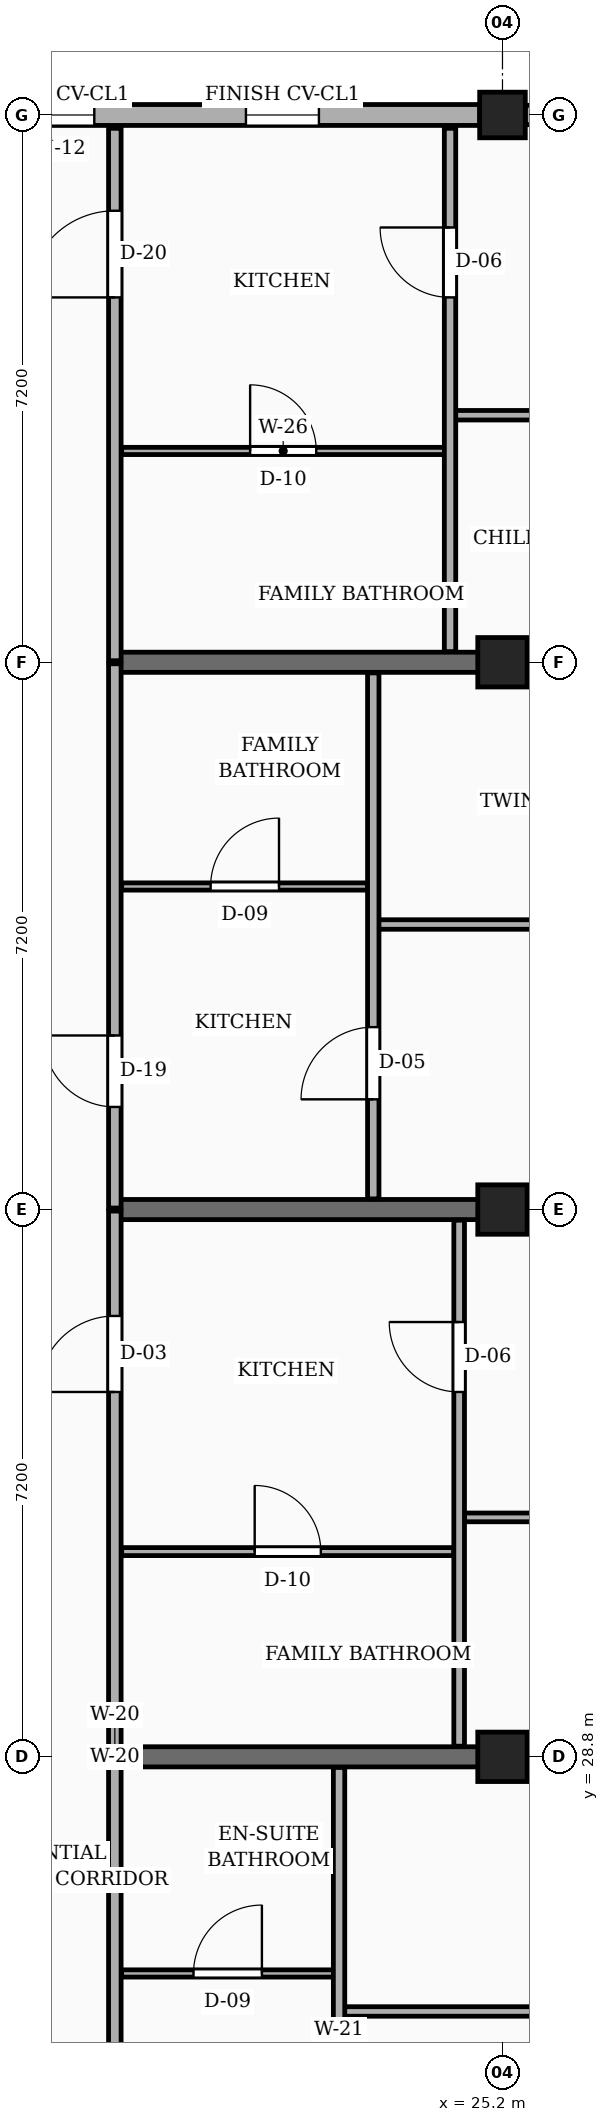
"""IFC4 building model, lengths in metres.
Left out: names, types, materials, properties, quantities, classifications, styles, units other than length and angle.
Written with IfcOpenShell. Run it as: python <this file> out.ifc"""

import sys

from ifc_helpers import new_model, si_unit, direction, frame, frame_2d, origin, origin_2d, place, context, subcontext, project, spatial, rectangle, extrude, element, fill, save


model = new_model("IFC4")
c1 = context("Model", 3, precision=1e-05, world=origin(), true_north=direction((0.0, 1.0)))
c2 = subcontext(c1, "Body", "Model", "MODEL_VIEW")
j1 = project(units=[si_unit("LENGTHUNIT", "METRE"), si_unit("PLANEANGLEUNIT", "RADIAN")], contexts=[c1])
p1 = place(None, origin())
s1 = spatial("IfcSite", under=j1, at=p1, CompositionType="ELEMENT")
p2 = place(p1, origin())
s2 = spatial("IfcBuilding", under=s1, at=p2, CompositionType="ELEMENT")
p3 = place(p2, frame((0.0, 0.0, 7.65)))
s3 = spatial("IfcBuildingStorey", under=s2, at=p3, CompositionType="ELEMENT", Elevation=7.65)
for number, where, z_axis, x_axis in (
    (1, (25.2, 28.8, 0.0), (0.0, 0.0, 1.0), (1.0, 0.0, 0.0)),
    (2, (25.2, 36.0, 0.0), (0.0, 0.0, 1.0), (1.0, 0.0, 0.0)),
    (3, (25.2, 43.2, 0.0), (0.0, 0.0, 1.0), (1.0, 0.0, 0.0)),
):
    element("IfcColumn", number, at=place(p3, frame(where, z_axis=z_axis, x_axis=x_axis)), inside=s3, PredefinedType="COLUMN", context=c2, shape_type="SweptSolid", body=[
        extrude(rectangle(XDim=0.65, YDim=0.65, at=origin_2d()), origin(), (0.0, 0.0, 1.0), 3.15),
    ])
p4 = place(p3, frame((25.2, 50.4, 0.0), z_axis=(0.0, 0.0, 1.0), x_axis=(1.0, 0.0, 0.0)))
e4 = element("IfcColumn", 4, at=p4, inside=s3, PredefinedType="COLUMN", context=c2, shape_type="SweptSolid", body=[
    extrude(rectangle(XDim=0.6, YDim=0.6, at=origin_2d()), origin(), (0.0, 0.0, 1.0), 3.15),
])
for number, where, z_axis, x_axis in (
    (5, (20.1, 28.8, 0.0), (0.0, 0.0, 1.0), (1.0, 0.0, 0.0)),
    (6, (20.1, 36.0, 0.0), (0.0, 0.0, 1.0), (1.0, 0.0, 0.0)),
    (7, (20.1, 43.2, 0.0), (0.0, 0.0, 1.0), (1.0, 0.0, 0.0)),
):
    element("IfcWall", number, at=place(p3, frame(where, z_axis=z_axis, x_axis=x_axis)), inside=s3, PredefinedType="SOLIDWALL", context=c2, shape_type="SweptSolid", body=[
        extrude(rectangle(XDim=12.0, YDim=0.265, at=frame_2d((6.0, 0.0))), origin(), (0.0, 0.0, 1.0), 2.17),
    ])
p5 = place(p3, frame((32.1, 50.4, 0.0), z_axis=(0.0, 0.0, 1.0), x_axis=(-1.0, 0.0, 0.0)))
e8 = element("IfcWall", 8, at=p5, inside=s3, PredefinedType="SOLIDWALL", context=c2, shape_type="SweptSolid", body=[
    extrude(rectangle(XDim=6.6, YDim=0.255, at=frame_2d((3.3, 0.0))), origin(), (0.0, 0.0, 1.0), 2.44),
])
p6 = place(p5, frame((0.45, 0.0, 0.78)))
e9 = element("IfcOpeningElement", 9, at=p6, cuts=e8, PredefinedType="OPENING", context=c2, shape_type="SweptSolid", body=[
    extrude(rectangle(XDim=1.4, YDim=1.15, at=frame_2d((0.7, 0.575))), frame((0.0, 0.137, 0.0), z_axis=(0.0, -1.0, 0.0), x_axis=(1.0, 0.0, 0.0)), (0.0, 0.0, 1.0), 0.275),
])
p7 = place(p5, frame((4.65, 0.0, 0.78)))
e10 = element("IfcOpeningElement", 10, at=p7, cuts=e8, PredefinedType="OPENING", context=c2, shape_type="SweptSolid", body=[
    extrude(rectangle(XDim=0.96, YDim=1.26, at=frame_2d((0.48, 0.63))), frame((0.0, 0.137, 0.0), z_axis=(0.0, -1.0, 0.0), x_axis=(1.0, 0.0, 0.0)), (0.0, 0.0, 1.0), 0.275),
])
p8 = place(p3, frame((24.9, 50.4, 0.0), z_axis=(0.0, 0.0, 1.0), x_axis=(-1.0, 0.0, 0.0)))
e11 = element("IfcWall", 11, at=p8, inside=s3, PredefinedType="SOLIDWALL", context=c2, shape_type="SweptSolid", body=[
    extrude(rectangle(XDim=6.6, YDim=0.275, at=frame_2d((3.3, 0.0))), origin(), (0.0, 0.0, 1.0), 2.44),
])
p9 = place(p8, frame((2.115, 0.0, 0.78)))
e12 = element("IfcOpeningElement", 12, at=p9, cuts=e11, PredefinedType="OPENING", context=c2, shape_type="SweptSolid", body=[
    extrude(rectangle(XDim=0.96, YDim=1.26, at=frame_2d((0.48, 0.63))), frame((0.0, 0.147, 0.0), z_axis=(0.0, -1.0, 0.0), x_axis=(1.0, 0.0, 0.0)), (0.0, 0.0, 1.0), 0.295),
])
p10 = place(p8, frame((5.07, 0.0, 0.78)))
e13 = element("IfcOpeningElement", 13, at=p10, cuts=e11, PredefinedType="OPENING", context=c2, shape_type="SweptSolid", body=[
    extrude(rectangle(XDim=1.12, YDim=1.26, at=frame_2d((0.56, 0.63))), frame((0.0, 0.147, 0.0), z_axis=(0.0, -1.0, 0.0), x_axis=(1.0, 0.0, 0.0)), (0.0, 0.0, 1.0), 0.295),
])
p11 = place(p3, frame((20.1, 21.62, 0.0), z_axis=(0.0, 0.0, 1.0), x_axis=(0.0, 1.0, 0.0)))
e14 = element("IfcWall", 14, at=p11, inside=s3, PredefinedType="PARTITIONING", context=c2, shape_type="SweptSolid", body=[
    extrude(rectangle(XDim=7.16, YDim=0.165, at=frame_2d((3.58, 0.0))), origin(), (0.0, 0.0, 1.0), 2.305),
])
p12 = place(p11, frame((1.33, 0.0, 0.0)))
e15 = element("IfcOpeningElement", 15, at=p12, cuts=e14, PredefinedType="OPENING", context=c2, shape_type="SweptSolid", body=[
    extrude(rectangle(XDim=1.14, YDim=2.18, at=frame_2d((0.57, 1.09))), frame((0.0, 0.093, 0.0), z_axis=(0.0, -1.0, 0.0), x_axis=(1.0, 0.0, 0.0)), (0.0, 0.0, 1.0), 0.185),
])
p13 = place(p3, frame((20.1, 28.82, 0.0), z_axis=(0.0, 0.0, 1.0), x_axis=(0.0, 1.0, 0.0)))
e16 = element("IfcWall", 16, at=p13, inside=s3, PredefinedType="PARTITIONING", context=c2, shape_type="SweptSolid", body=[
    extrude(rectangle(XDim=7.16, YDim=0.165, at=frame_2d((3.58, 0.0))), origin(), (0.0, 0.0, 1.0), 2.305),
])
p14 = place(p13, frame((4.78, 0.0, 0.0)))
e17 = element("IfcOpeningElement", 17, at=p14, cuts=e16, PredefinedType="OPENING", context=c2, shape_type="SweptSolid", body=[
    extrude(rectangle(XDim=1.0, YDim=2.15, at=frame_2d((0.5, 1.075))), frame((0.0, 0.093, 0.0), z_axis=(0.0, -1.0, 0.0), x_axis=(1.0, 0.0, 0.0)), (0.0, 0.0, 1.0), 0.185),
])
p15 = place(p3, frame((20.1, 36.02, 0.0), z_axis=(0.0, 0.0, 1.0), x_axis=(0.0, 1.0, 0.0)))
e18 = element("IfcWall", 18, at=p15, inside=s3, PredefinedType="PARTITIONING", context=c2, shape_type="SweptSolid", body=[
    extrude(rectangle(XDim=7.16, YDim=0.165, at=frame_2d((3.58, 0.0))), origin(), (0.0, 0.0, 1.0), 2.305),
])
p16 = place(p15, frame((1.33, 0.0, 0.0)))
e19 = element("IfcOpeningElement", 19, at=p16, cuts=e18, PredefinedType="OPENING", context=c2, shape_type="SweptSolid", body=[
    extrude(rectangle(XDim=0.94, YDim=2.12, at=frame_2d((0.47, 1.06))), frame((0.0, 0.093, 0.0), z_axis=(0.0, -1.0, 0.0), x_axis=(1.0, 0.0, 0.0)), (0.0, 0.0, 1.0), 0.185),
])
p17 = place(p3, frame((20.1, 43.22, 0.0), z_axis=(0.0, 0.0, 1.0), x_axis=(0.0, 1.0, 0.0)))
e20 = element("IfcWall", 20, at=p17, inside=s3, PredefinedType="PARTITIONING", context=c2, shape_type="SweptSolid", body=[
    extrude(rectangle(XDim=7.005, YDim=0.165, at=frame_2d((3.502, 0.0))), origin(), (0.0, 0.0, 1.0), 2.305),
])
p18 = place(p17, frame((4.78, 0.0, 0.0)))
e21 = element("IfcOpeningElement", 21, at=p18, cuts=e20, PredefinedType="OPENING", context=c2, shape_type="SweptSolid", body=[
    extrude(rectangle(XDim=1.14, YDim=2.18, at=frame_2d((0.57, 1.09))), frame((0.0, 0.093, 0.0), z_axis=(0.0, -1.0, 0.0), x_axis=(1.0, 0.0, 0.0)), (0.0, 0.0, 1.0), 0.185),
])
p19 = place(p3, frame((23.12, 25.45, 0.0), z_axis=(0.0, 0.0, 1.0), x_axis=(1.0, 0.0, 0.0)))
e22 = element("IfcWall", 22, at=p19, inside=s3, PredefinedType="PARTITIONING", context=c2, shape_type="SweptSolid", body=[
    extrude(rectangle(XDim=9.105, YDim=0.125, at=frame_2d((4.552, 0.0))), origin(), (0.0, 0.0, 1.0), 2.305),
])
p20 = place(p19, frame((4.103, 0.0, 0.0)))
e23 = element("IfcOpeningElement", 23, at=p20, cuts=e22, PredefinedType="OPENING", context=c2, shape_type="SweptSolid", body=[
    extrude(rectangle(XDim=0.9, YDim=2.1, at=frame_2d((0.45, 1.05))), frame((0.0, 0.073, 0.0), z_axis=(0.0, -1.0, 0.0), x_axis=(1.0, 0.0, 0.0)), (0.0, 0.0, 1.0), 0.145),
])
p21 = place(p3, frame((20.19, 25.95, 0.0), z_axis=(0.0, 0.0, 1.0), x_axis=(1.0, 0.0, 0.0)))
e24 = element("IfcWall", 24, at=p21, inside=s3, PredefinedType="PARTITIONING", context=c2, shape_type="SweptSolid", body=[
    extrude(rectangle(XDim=2.79, YDim=0.095, at=frame_2d((1.395, 0.0))), origin(), (0.0, 0.0, 1.0), 2.305),
])
p22 = place(p21, frame((0.945, 0.0, 0.0)))
e25 = element("IfcOpeningElement", 25, at=p22, cuts=e24, PredefinedType="OPENING", context=c2, shape_type="SweptSolid", body=[
    extrude(rectangle(XDim=0.9, YDim=2.05, at=frame_2d((0.45, 1.025))), frame((0.0, 0.058, 0.0), z_axis=(0.0, -1.0, 0.0), x_axis=(1.0, 0.0, 0.0)), (0.0, 0.0, 1.0), 0.115),
])
p23 = place(p3, frame((23.05, 21.74, 0.0), z_axis=(0.0, 0.0, 1.0), x_axis=(0.0, 1.0, 0.0)))
e26 = element("IfcWall", 26, at=p23, inside=s3, PredefinedType="PARTITIONING", context=c2, shape_type="SweptSolid", body=[
    extrude(rectangle(XDim=6.92, YDim=0.15, at=frame_2d((3.46, 0.0))), origin(), (0.0, 0.0, 1.0), 2.305),
])
p24 = place(p23, frame((1.31, 0.0, 0.0)))
e27 = element("IfcOpeningElement", 27, at=p24, cuts=e26, PredefinedType="OPENING", context=c2, shape_type="SweptSolid", body=[
    extrude(rectangle(XDim=0.95, YDim=2.1, at=frame_2d((0.475, 1.05))), frame((0.0, 0.085, 0.0), z_axis=(0.0, -1.0, 0.0), x_axis=(1.0, 0.0, 0.0)), (0.0, 0.0, 1.0), 0.17),
])
p25 = place(p3, frame((24.7, 31.95, 0.0), z_axis=(0.0, 0.0, 1.0), x_axis=(1.0, 0.0, 0.0)))
e28 = element("IfcWall", 28, at=p25, inside=s3, PredefinedType="PARTITIONING", context=c2, shape_type="SweptSolid", body=[
    extrude(rectangle(XDim=7.525, YDim=0.115, at=frame_2d((3.763, 0.0))), origin(), (0.0, 0.0, 1.0), 2.305),
])
p26 = place(p25, frame((3.323, 0.0, 0.0)))
e29 = element("IfcOpeningElement", 29, at=p26, cuts=e28, PredefinedType="OPENING", context=c2, shape_type="SweptSolid", body=[
    extrude(rectangle(XDim=0.88, YDim=2.08, at=frame_2d((0.44, 1.04))), frame((0.0, 0.067, 0.0), z_axis=(0.0, -1.0, 0.0), x_axis=(1.0, 0.0, 0.0)), (0.0, 0.0, 1.0), 0.135),
])
p27 = place(p3, frame((20.19, 31.5, 0.0), z_axis=(0.0, 0.0, 1.0), x_axis=(1.0, 0.0, 0.0)))
e30 = element("IfcWall", 30, at=p27, inside=s3, PredefinedType="PARTITIONING", context=c2, shape_type="SweptSolid", body=[
    extrude(rectangle(XDim=4.37, YDim=0.105, at=frame_2d((2.185, 0.0))), origin(), (0.0, 0.0, 1.0), 2.305),
])
p28 = place(p27, frame((1.75, 0.0, 0.0)))
e31 = element("IfcOpeningElement", 31, at=p28, cuts=e30, PredefinedType="OPENING", context=c2, shape_type="SweptSolid", body=[
    extrude(rectangle(XDim=0.87, YDim=2.05, at=frame_2d((0.435, 1.025))), frame((0.0, 0.062, 0.0), z_axis=(0.0, -1.0, 0.0), x_axis=(1.0, 0.0, 0.0)), (0.0, 0.0, 1.0), 0.125),
])
p29 = place(p3, frame((24.63, 28.94, 0.0), z_axis=(0.0, 0.0, 1.0), x_axis=(0.0, 1.0, 0.0)))
e32 = element("IfcWall", 32, at=p29, inside=s3, PredefinedType="PARTITIONING", context=c2, shape_type="SweptSolid", body=[
    extrude(rectangle(XDim=6.92, YDim=0.14, at=frame_2d((3.46, 0.0))), origin(), (0.0, 0.0, 1.0), 2.305),
])
p30 = place(p29, frame((4.66, 0.0, 0.0)))
e33 = element("IfcOpeningElement", 33, at=p30, cuts=e32, PredefinedType="OPENING", context=c2, shape_type="SweptSolid", body=[
    extrude(rectangle(XDim=0.92, YDim=2.1, at=frame_2d((0.46, 1.05))), frame((0.0, 0.08, 0.0), z_axis=(0.0, -1.0, 0.0), x_axis=(1.0, 0.0, 0.0)), (0.0, 0.0, 1.0), 0.16),
])
p31 = place(p3, frame((23.57, 39.75, 0.0), z_axis=(0.0, 0.0, 1.0), x_axis=(1.0, 0.0, 0.0)))
e34 = element("IfcWall", 34, at=p31, inside=s3, PredefinedType="PARTITIONING", context=c2, shape_type="SweptSolid", body=[
    extrude(rectangle(XDim=8.655, YDim=0.125, at=frame_2d((4.328, 0.0))), origin(), (0.0, 0.0, 1.0), 2.305),
])
p32 = place(p31, frame((3.877, 0.0, 0.0)))
e35 = element("IfcOpeningElement", 35, at=p32, cuts=e34, PredefinedType="OPENING", context=c2, shape_type="SweptSolid", body=[
    extrude(rectangle(XDim=0.9, YDim=2.1, at=frame_2d((0.45, 1.05))), frame((0.0, 0.073, 0.0), z_axis=(0.0, -1.0, 0.0), x_axis=(1.0, 0.0, 0.0)), (0.0, 0.0, 1.0), 0.145),
])
p33 = place(p3, frame((20.19, 40.25, 0.0), z_axis=(0.0, 0.0, 1.0), x_axis=(1.0, 0.0, 0.0)))
e36 = element("IfcWall", 36, at=p33, inside=s3, PredefinedType="PARTITIONING", context=c2, shape_type="SweptSolid", body=[
    extrude(rectangle(XDim=3.24, YDim=0.095, at=frame_2d((1.62, 0.0))), origin(), (0.0, 0.0, 1.0), 2.305),
])
p34 = place(p33, frame((1.17, 0.0, 0.0)))
e37 = element("IfcOpeningElement", 37, at=p34, cuts=e36, PredefinedType="OPENING", context=c2, shape_type="SweptSolid", body=[
    extrude(rectangle(XDim=0.9, YDim=2.05, at=frame_2d((0.45, 1.025))), frame((0.0, 0.058, 0.0), z_axis=(0.0, -1.0, 0.0), x_axis=(1.0, 0.0, 0.0)), (0.0, 0.0, 1.0), 0.115),
])
p35 = place(p3, frame((23.5, 36.14, 0.0), z_axis=(0.0, 0.0, 1.0), x_axis=(0.0, 1.0, 0.0)))
e38 = element("IfcWall", 38, at=p35, inside=s3, PredefinedType="PARTITIONING", context=c2, shape_type="SweptSolid", body=[
    extrude(rectangle(XDim=6.92, YDim=0.15, at=frame_2d((3.46, 0.0))), origin(), (0.0, 0.0, 1.0), 2.305),
])
p36 = place(p35, frame((1.31, 0.0, 0.0)))
e39 = element("IfcOpeningElement", 39, at=p36, cuts=e38, PredefinedType="OPENING", context=c2, shape_type="SweptSolid", body=[
    extrude(rectangle(XDim=0.95, YDim=2.1, at=frame_2d((0.475, 1.05))), frame((0.0, 0.085, 0.0), z_axis=(0.0, -1.0, 0.0), x_axis=(1.0, 0.0, 0.0)), (0.0, 0.0, 1.0), 0.17),
])
p37 = place(p3, frame((24.58, 46.45, 0.0), z_axis=(0.0, 0.0, 1.0), x_axis=(1.0, 0.0, 0.0)))
e40 = element("IfcWall", 40, at=p37, inside=s3, PredefinedType="PARTITIONING", context=c2, shape_type="SweptSolid", body=[
    extrude(rectangle(XDim=7.645, YDim=0.125, at=frame_2d((3.823, 0.0))), origin(), (0.0, 0.0, 1.0), 2.305),
])
p38 = place(p37, frame((3.383, 0.0, 0.0)))
e41 = element("IfcOpeningElement", 41, at=p38, cuts=e40, PredefinedType="OPENING", context=c2, shape_type="SweptSolid", body=[
    extrude(rectangle(XDim=0.88, YDim=2.08, at=frame_2d((0.44, 1.04))), frame((0.0, 0.073, 0.0), z_axis=(0.0, -1.0, 0.0), x_axis=(1.0, 0.0, 0.0)), (0.0, 0.0, 1.0), 0.145),
])
p39 = place(p3, frame((20.19, 45.98, 0.0), z_axis=(0.0, 0.0, 1.0), x_axis=(1.0, 0.0, 0.0)))
e42 = element("IfcWall", 42, at=p39, inside=s3, PredefinedType="PARTITIONING", context=c2, shape_type="SweptSolid", body=[
    extrude(rectangle(XDim=4.25, YDim=0.095, at=frame_2d((2.125, 0.0))), origin(), (0.0, 0.0, 1.0), 2.305),
])
p40 = place(p39, frame((1.69, 0.0, 0.0)))
e43 = element("IfcOpeningElement", 43, at=p40, cuts=e42, PredefinedType="OPENING", context=c2, shape_type="SweptSolid", body=[
    extrude(rectangle(XDim=0.87, YDim=2.05, at=frame_2d((0.435, 1.025))), frame((0.0, 0.058, 0.0), z_axis=(0.0, -1.0, 0.0), x_axis=(1.0, 0.0, 0.0)), (0.0, 0.0, 1.0), 0.115),
])
p41 = place(p3, frame((24.51, 43.34, 0.0), z_axis=(0.0, 0.0, 1.0), x_axis=(0.0, 1.0, 0.0)))
e44 = element("IfcWall", 44, at=p41, inside=s3, PredefinedType="PARTITIONING", context=c2, shape_type="SweptSolid", body=[
    extrude(rectangle(XDim=6.885, YDim=0.15, at=frame_2d((3.442, 0.0))), origin(), (0.0, 0.0, 1.0), 2.305),
])
p42 = place(p41, frame((4.66, 0.0, 0.0)))
e45 = element("IfcOpeningElement", 45, at=p42, cuts=e44, PredefinedType="OPENING", context=c2, shape_type="SweptSolid", body=[
    extrude(rectangle(XDim=0.92, YDim=2.1, at=frame_2d((0.46, 1.05))), frame((0.0, 0.085, 0.0), z_axis=(0.0, -1.0, 0.0), x_axis=(1.0, 0.0, 0.0)), (0.0, 0.0, 1.0), 0.17),
])
p43 = place(p9, origin())
e46 = element("IfcWindow", 46, at=p43, inside=s3, PartitioningType="SINGLE_PANEL", PredefinedType="WINDOW", context=c2, shape_type="SweptSolid", body=[
    extrude(rectangle(XDim=0.96, YDim=1.26, at=frame_2d((0.48, 0.63))), frame((0.0, 0.03, 0.0), z_axis=(0.0, -1.0, 0.0), x_axis=(1.0, 0.0, 0.0)), (0.0, 0.0, 1.0), 0.06),
])
fill(e12, e46)
p44 = place(p10, origin())
e47 = element("IfcWindow", 47, at=p44, inside=s3, PartitioningType="SINGLE_PANEL", PredefinedType="WINDOW", context=c2, shape_type="SweptSolid", body=[
    extrude(rectangle(XDim=1.12, YDim=1.26, at=frame_2d((0.56, 0.63))), frame((0.0, 0.03, 0.0), z_axis=(0.0, -1.0, 0.0), x_axis=(1.0, 0.0, 0.0)), (0.0, 0.0, 1.0), 0.06),
])
fill(e13, e47)
p45 = place(p14, origin())
e48 = element("IfcDoor", 48, at=p45, inside=s3, OperationType="SINGLE_SWING_LEFT", PredefinedType="DOOR", context=c2, shape_type="SweptSolid", body=[
    extrude(rectangle(XDim=1.0, YDim=2.15, at=frame_2d((0.5, 1.075))), frame((0.0, 0.025, 0.0), z_axis=(0.0, -1.0, 0.0), x_axis=(1.0, 0.0, 0.0)), (0.0, 0.0, 1.0), 0.05),
])
fill(e17, e48)
p46 = place(p16, origin())
e49 = element("IfcDoor", 49, at=p46, inside=s3, OperationType="SINGLE_SWING_RIGHT", PredefinedType="DOOR", context=c2, shape_type="SweptSolid", body=[
    extrude(rectangle(XDim=0.94, YDim=2.12, at=frame_2d((0.47, 1.06))), frame((0.0, 0.025, 0.0), z_axis=(0.0, -1.0, 0.0), x_axis=(1.0, 0.0, 0.0)), (0.0, 0.0, 1.0), 0.05),
])
fill(e19, e49)
p47 = place(p18, origin())
e50 = element("IfcDoor", 50, at=p47, inside=s3, OperationType="SINGLE_SWING_LEFT", PredefinedType="DOOR", context=c2, shape_type="SweptSolid", body=[
    extrude(rectangle(XDim=1.14, YDim=2.18, at=frame_2d((0.57, 1.09))), frame((0.0, 0.025, 0.0), z_axis=(0.0, -1.0, 0.0), x_axis=(1.0, 0.0, 0.0)), (0.0, 0.0, 1.0), 0.05),
])
fill(e21, e50)
p48 = place(p22, origin())
e51 = element("IfcDoor", 51, at=p48, inside=s3, OperationType="SINGLE_SWING_RIGHT", PredefinedType="DOOR", context=c2, shape_type="SweptSolid", body=[
    extrude(rectangle(XDim=0.9, YDim=2.05, at=frame_2d((0.45, 1.025))), frame((0.0, 0.025, 0.0), z_axis=(0.0, -1.0, 0.0), x_axis=(1.0, 0.0, 0.0)), (0.0, 0.0, 1.0), 0.05),
])
fill(e25, e51)
p49 = place(p28, origin())
e52 = element("IfcDoor", 52, at=p49, inside=s3, OperationType="SINGLE_SWING_LEFT", PredefinedType="DOOR", context=c2, shape_type="SweptSolid", body=[
    extrude(rectangle(XDim=0.87, YDim=2.05, at=frame_2d((0.435, 1.025))), frame((0.0, 0.025, 0.0), z_axis=(0.0, -1.0, 0.0), x_axis=(1.0, 0.0, 0.0)), (0.0, 0.0, 1.0), 0.05),
])
fill(e31, e52)
p50 = place(p30, origin())
e53 = element("IfcDoor", 53, at=p50, inside=s3, OperationType="SINGLE_SWING_RIGHT", PredefinedType="DOOR", context=c2, shape_type="SweptSolid", body=[
    extrude(rectangle(XDim=0.92, YDim=2.1, at=frame_2d((0.46, 1.05))), frame((0.0, 0.025, 0.0), z_axis=(0.0, -1.0, 0.0), x_axis=(1.0, 0.0, 0.0)), (0.0, 0.0, 1.0), 0.05),
])
fill(e33, e53)
p51 = place(p34, origin())
e54 = element("IfcDoor", 54, at=p51, inside=s3, OperationType="SINGLE_SWING_RIGHT", PredefinedType="DOOR", context=c2, shape_type="SweptSolid", body=[
    extrude(rectangle(XDim=0.9, YDim=2.05, at=frame_2d((0.45, 1.025))), frame((0.0, 0.025, 0.0), z_axis=(0.0, -1.0, 0.0), x_axis=(1.0, 0.0, 0.0)), (0.0, 0.0, 1.0), 0.05),
])
fill(e37, e54)
p52 = place(p36, origin())
e55 = element("IfcDoor", 55, at=p52, inside=s3, OperationType="SINGLE_SWING_LEFT", PredefinedType="DOOR", context=c2, shape_type="SweptSolid", body=[
    extrude(rectangle(XDim=0.95, YDim=2.1, at=frame_2d((0.475, 1.05))), frame((0.0, 0.025, 0.0), z_axis=(0.0, -1.0, 0.0), x_axis=(1.0, 0.0, 0.0)), (0.0, 0.0, 1.0), 0.05),
])
fill(e39, e55)
p53 = place(p40, origin())
e56 = element("IfcDoor", 56, at=p53, inside=s3, OperationType="SINGLE_SWING_LEFT", PredefinedType="DOOR", context=c2, shape_type="SweptSolid", body=[
    extrude(rectangle(XDim=0.87, YDim=2.05, at=frame_2d((0.435, 1.025))), frame((0.0, 0.025, 0.0), z_axis=(0.0, -1.0, 0.0), x_axis=(1.0, 0.0, 0.0)), (0.0, 0.0, 1.0), 0.05),
])
fill(e43, e56)
p54 = place(p42, origin())
e57 = element("IfcDoor", 57, at=p54, inside=s3, OperationType="SINGLE_SWING_RIGHT", PredefinedType="DOOR", context=c2, shape_type="SweptSolid", body=[
    extrude(rectangle(XDim=0.92, YDim=2.1, at=frame_2d((0.46, 1.05))), frame((0.0, 0.025, 0.0), z_axis=(0.0, -1.0, 0.0), x_axis=(1.0, 0.0, 0.0)), (0.0, 0.0, 1.0), 0.05),
])
fill(e45, e57)
save(model, sys.argv[1])
